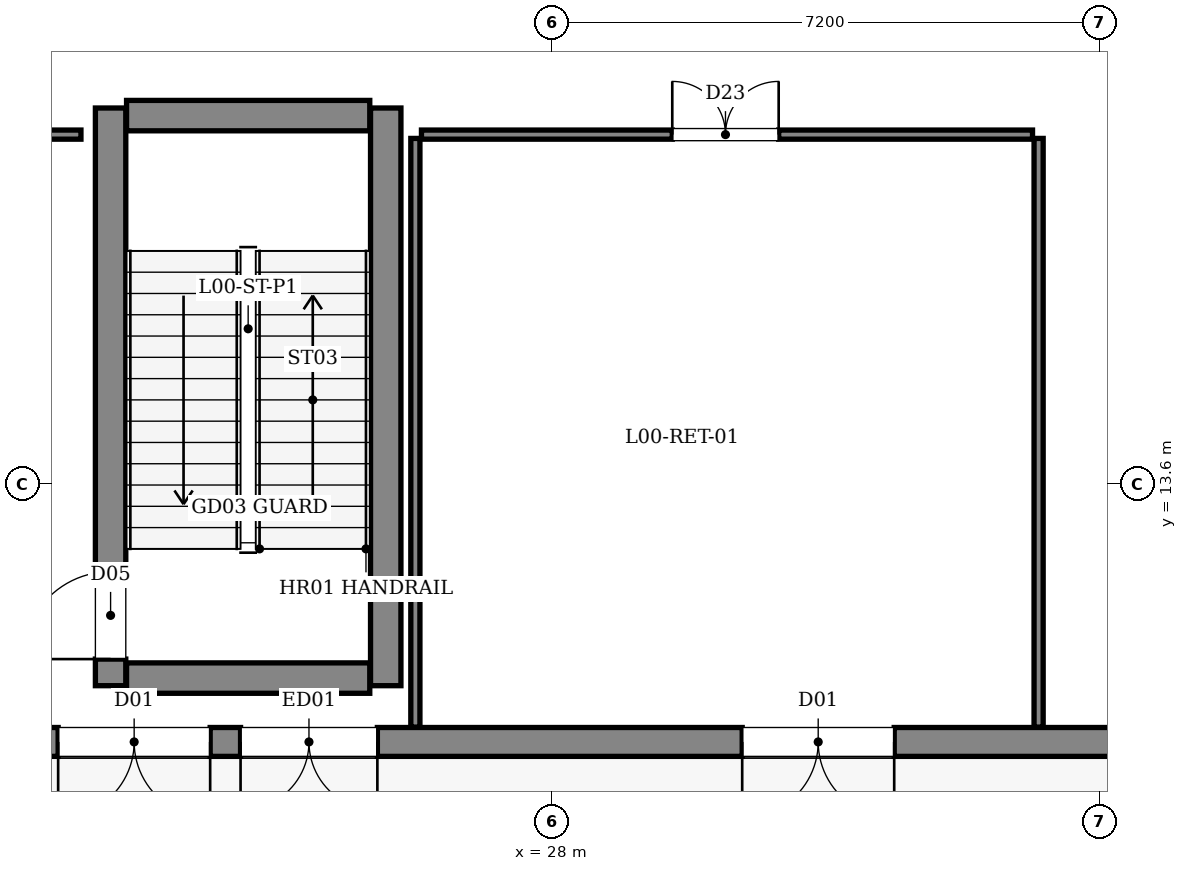
"""IFC4 building model, lengths in metres.
Left out: names, types, materials, properties, quantities, classifications, styles, units other than length and angle.
Written with IfcOpenShell. Run it as: python <this file> out.ifc"""

import sys

from ifc_helpers import new_model, si_unit, direction, frame, frame_2d, origin, place, context, subcontext, project, spatial, rectangle, extrude, element, fill, save


model = new_model("IFC4")
c1 = context("Model", 3, precision=1e-05, world=origin(), true_north=direction((0.0, 1.0)))
c2 = subcontext(c1, "Body", "Model", "MODEL_VIEW")
j1 = project(units=[si_unit("LENGTHUNIT", "METRE"), si_unit("PLANEANGLEUNIT", "RADIAN")], contexts=[c1])
p1 = place(None, origin())
s1 = spatial("IfcSite", under=j1, at=p1, CompositionType="ELEMENT")
p2 = place(p1, origin())
s2 = spatial("IfcBuilding", under=s1, at=p2, CompositionType="ELEMENT")
p3 = place(p2, origin())
s3 = spatial("IfcBuildingStorey", under=s2, at=p3, CompositionType="ELEMENT", Elevation=0.0)
p4 = place(p3, frame((46.3, 10.21, 0.0), z_axis=(0.0, 0.0, 1.0), x_axis=(-1.0, 0.0, 0.0)))
e1 = element("IfcWall", 1, at=p4, inside=s3, PredefinedType="STANDARD", context=c2, shape_type="SweptSolid", body=[
    extrude(rectangle(XDim=34.1, YDim=0.38, at=frame_2d((17.05, 0.0))), origin(), (0.0, 0.0, 1.0), 3.135),
])
p5 = place(p4, frame((13.8, 0.0, 0.0)))
e2 = element("IfcOpeningElement", 2, at=p5, cuts=e1, PredefinedType="OPENING", context=c2, shape_type="SweptSolid", body=[
    extrude(rectangle(XDim=2.0, YDim=2.3, at=frame_2d((1.0, 1.15))), frame((0.0, 0.2, 0.0), z_axis=(0.0, -1.0, 0.0), x_axis=(1.0, 0.0, 0.0)), (0.0, 0.0, 1.0), 0.4),
])
p6 = place(p4, frame((20.6, 0.0, 0.0)))
e3 = element("IfcOpeningElement", 3, at=p6, cuts=e1, PredefinedType="OPENING", context=c2, shape_type="SweptSolid", body=[
    extrude(rectangle(XDim=1.8, YDim=2.3, at=frame_2d((0.9, 1.15))), frame((0.0, 0.2, 0.0), z_axis=(0.0, -1.0, 0.0), x_axis=(1.0, 0.0, 0.0)), (0.0, 0.0, 1.0), 0.4),
])
p7 = place(p4, frame((22.8, 0.0, 0.0)))
e4 = element("IfcOpeningElement", 4, at=p7, cuts=e1, PredefinedType="OPENING", context=c2, shape_type="SweptSolid", body=[
    extrude(rectangle(XDim=2.0, YDim=2.3, at=frame_2d((1.0, 1.15))), frame((0.0, 0.2, 0.0), z_axis=(0.0, -1.0, 0.0), x_axis=(1.0, 0.0, 0.0)), (0.0, 0.0, 1.0), 0.4),
])
p8 = place(p4, frame((28.8, 0.0, 0.0)))
e5 = element("IfcOpeningElement", 5, at=p8, cuts=e1, PredefinedType="OPENING", context=c2, shape_type="SweptSolid", body=[
    extrude(rectangle(XDim=2.0, YDim=2.3, at=frame_2d((1.0, 1.15))), frame((0.0, 0.2, 0.0), z_axis=(0.0, -1.0, 0.0), x_axis=(1.0, 0.0, 0.0)), (0.0, 0.0, 1.0), 0.4),
])
p9 = place(p3, frame((22.19, 10.95, 0.0), z_axis=(0.0, 0.0, 1.0), x_axis=(0.0, 1.0, 0.0)))
e6 = element("IfcWall", 6, at=p9, inside=s3, PredefinedType="SHEAR", context=c2, shape_type="SweptSolid", body=[
    extrude(rectangle(XDim=7.6, YDim=0.4, at=frame_2d((3.8, 0.0))), origin(), (0.0, 0.0, 1.0), 4.95),
])
p10 = place(p9, frame((0.35, 0.0, 0.0)))
e7 = element("IfcOpeningElement", 7, at=p10, cuts=e6, PredefinedType="OPENING", context=c2, shape_type="SweptSolid", body=[
    extrude(rectangle(XDim=1.15, YDim=2.15, at=frame_2d((0.575, 1.075))), frame((0.0, 0.21, 0.0), z_axis=(0.0, -1.0, 0.0), x_axis=(1.0, 0.0, 0.0)), (0.0, 0.0, 1.0), 0.42),
])
p11 = place(p3, frame((25.81, 10.95, 0.0), z_axis=(0.0, 0.0, 1.0), x_axis=(0.0, 1.0, 0.0)))
e8 = element("IfcWall", 8, at=p11, inside=s3, PredefinedType="SHEAR", context=c2, shape_type="SweptSolid", body=[
    extrude(rectangle(XDim=7.6, YDim=0.4, at=frame_2d((3.8, 0.0))), origin(), (0.0, 0.0, 1.0), 4.95),
])
for number, where, z_axis, x_axis in (
    (9, (22.4, 11.05, 0.0), (0.0, 0.0, 1.0), (1.0, 0.0, 0.0)),
    (10, (22.4, 18.45, 0.0), (0.0, 0.0, 1.0), (1.0, 0.0, 0.0)),
):
    element("IfcWall", number, at=place(p3, frame(where, z_axis=z_axis, x_axis=x_axis)), inside=s3, PredefinedType="SHEAR", context=c2, shape_type="SweptSolid", body=[
        extrude(rectangle(XDim=3.2, YDim=0.4, at=frame_2d((1.6, 0.0))), origin(), (0.0, 0.0, 1.0), 4.95),
    ])
p12 = place(p3, frame((26.2, 10.405, 0.0), z_axis=(0.0, 0.0, 1.0), x_axis=(0.0, 1.0, 0.0)))
e11 = element("IfcWall", 11, at=p12, inside=s3, PredefinedType="PARTITIONING", context=c2, shape_type="SweptSolid", body=[
    extrude(rectangle(XDim=7.745, YDim=0.12, at=frame_2d((3.873, 0.0))), origin(), (0.0, 0.0, 1.0), 4.385),
])
p13 = place(p3, frame((34.4, 10.405, 0.0), z_axis=(0.0, 0.0, 1.0), x_axis=(0.0, 1.0, 0.0)))
e12 = element("IfcWall", 12, at=p13, inside=s3, PredefinedType="PARTITIONING", context=c2, shape_type="SweptSolid", body=[
    extrude(rectangle(XDim=7.745, YDim=0.12, at=frame_2d((3.873, 0.0))), origin(), (0.0, 0.0, 1.0), 4.95),
])
p14 = place(p3, frame((26.28, 18.2, 0.0), z_axis=(0.0, 0.0, 1.0), x_axis=(1.0, 0.0, 0.0)))
e13 = element("IfcWall", 13, at=p14, inside=s3, PredefinedType="PARTITIONING", context=c2, shape_type="SweptSolid", body=[
    extrude(rectangle(XDim=8.04, YDim=0.12, at=frame_2d((4.02, 0.0))), origin(), (0.0, 0.0, 1.0), 4.95),
])
p15 = place(p14, frame((3.3, 0.0, 0.0)))
e14 = element("IfcOpeningElement", 14, at=p15, cuts=e13, PredefinedType="OPENING", context=c2, shape_type="SweptSolid", body=[
    extrude(rectangle(XDim=1.4, YDim=2.15, at=frame_2d((0.7, 1.075))), frame((0.0, 0.07, 0.0), z_axis=(0.0, -1.0, 0.0), x_axis=(1.0, 0.0, 0.0)), (0.0, 0.0, 1.0), 0.14),
])
p16 = place(p3, frame((12.4, 18.2, 0.0), z_axis=(0.0, 0.0, 1.0), x_axis=(1.0, 0.0, 0.0)))
e15 = element("IfcWall", 15, at=p16, inside=s3, PredefinedType="PARTITIONING", context=c2, shape_type="SweptSolid", body=[
    extrude(rectangle(XDim=9.4, YDim=0.12, at=frame_2d((4.7, 0.0))), origin(), (0.0, 0.0, 1.0), 4.95),
])
p17 = place(p16, frame((4.0, 0.0, 0.0)))
e16 = element("IfcOpeningElement", 16, at=p17, cuts=e15, PredefinedType="OPENING", context=c2, shape_type="SweptSolid", body=[
    extrude(rectangle(XDim=1.4, YDim=2.15, at=frame_2d((0.7, 1.075))), frame((0.0, 0.07, 0.0), z_axis=(0.0, -1.0, 0.0), x_axis=(1.0, 0.0, 0.0)), (0.0, 0.0, 1.0), 0.14),
])
p18 = place(p5, origin())
e17 = element("IfcDoor", 17, at=p18, inside=s3, OperationType="DOUBLE_DOOR_SINGLE_SWING", PredefinedType="DOOR", context=c2, shape_type="SweptSolid", body=[
    extrude(rectangle(XDim=2.0, YDim=2.3, at=frame_2d((1.0, 1.15))), frame((0.0, 0.025, 0.0), z_axis=(0.0, -1.0, 0.0), x_axis=(1.0, 0.0, 0.0)), (0.0, 0.0, 1.0), 0.05),
])
fill(e2, e17)
p19 = place(p6, origin())
e18 = element("IfcDoor", 18, at=p19, inside=s3, OperationType="DOUBLE_DOOR_SINGLE_SWING", PredefinedType="DOOR", context=c2, shape_type="SweptSolid", body=[
    extrude(rectangle(XDim=1.8, YDim=2.3, at=frame_2d((0.9, 1.15))), frame((0.0, 0.025, 0.0), z_axis=(0.0, -1.0, 0.0), x_axis=(1.0, 0.0, 0.0)), (0.0, 0.0, 1.0), 0.05),
])
fill(e3, e18)
p20 = place(p7, origin())
e19 = element("IfcDoor", 19, at=p20, inside=s3, OperationType="DOUBLE_DOOR_SINGLE_SWING", PredefinedType="DOOR", context=c2, shape_type="SweptSolid", body=[
    extrude(rectangle(XDim=2.0, YDim=2.3, at=frame_2d((1.0, 1.15))), frame((0.0, 0.025, 0.0), z_axis=(0.0, -1.0, 0.0), x_axis=(1.0, 0.0, 0.0)), (0.0, 0.0, 1.0), 0.05),
])
fill(e4, e19)
p21 = place(p10, origin())
e20 = element("IfcDoor", 20, at=p21, inside=s3, OperationType="SINGLE_SWING_LEFT", PredefinedType="DOOR", context=c2, shape_type="SweptSolid", body=[
    extrude(rectangle(XDim=1.15, YDim=2.15, at=frame_2d((0.575, 1.075))), frame((0.0, 0.025, 0.0), z_axis=(0.0, -1.0, 0.0), x_axis=(1.0, 0.0, 0.0)), (0.0, 0.0, 1.0), 0.05),
])
fill(e7, e20)
p22 = place(p15, origin())
e21 = element("IfcDoor", 21, at=p22, inside=s3, OperationType="DOUBLE_DOOR_SINGLE_SWING", PredefinedType="DOOR", context=c2, shape_type="SweptSolid", body=[
    extrude(rectangle(XDim=1.4, YDim=2.15, at=frame_2d((0.7, 1.075))), frame((0.0, 0.025, 0.0), z_axis=(0.0, -1.0, 0.0), x_axis=(1.0, 0.0, 0.0)), (0.0, 0.0, 1.0), 0.05),
])
fill(e14, e21)
save(model, sys.argv[1])
